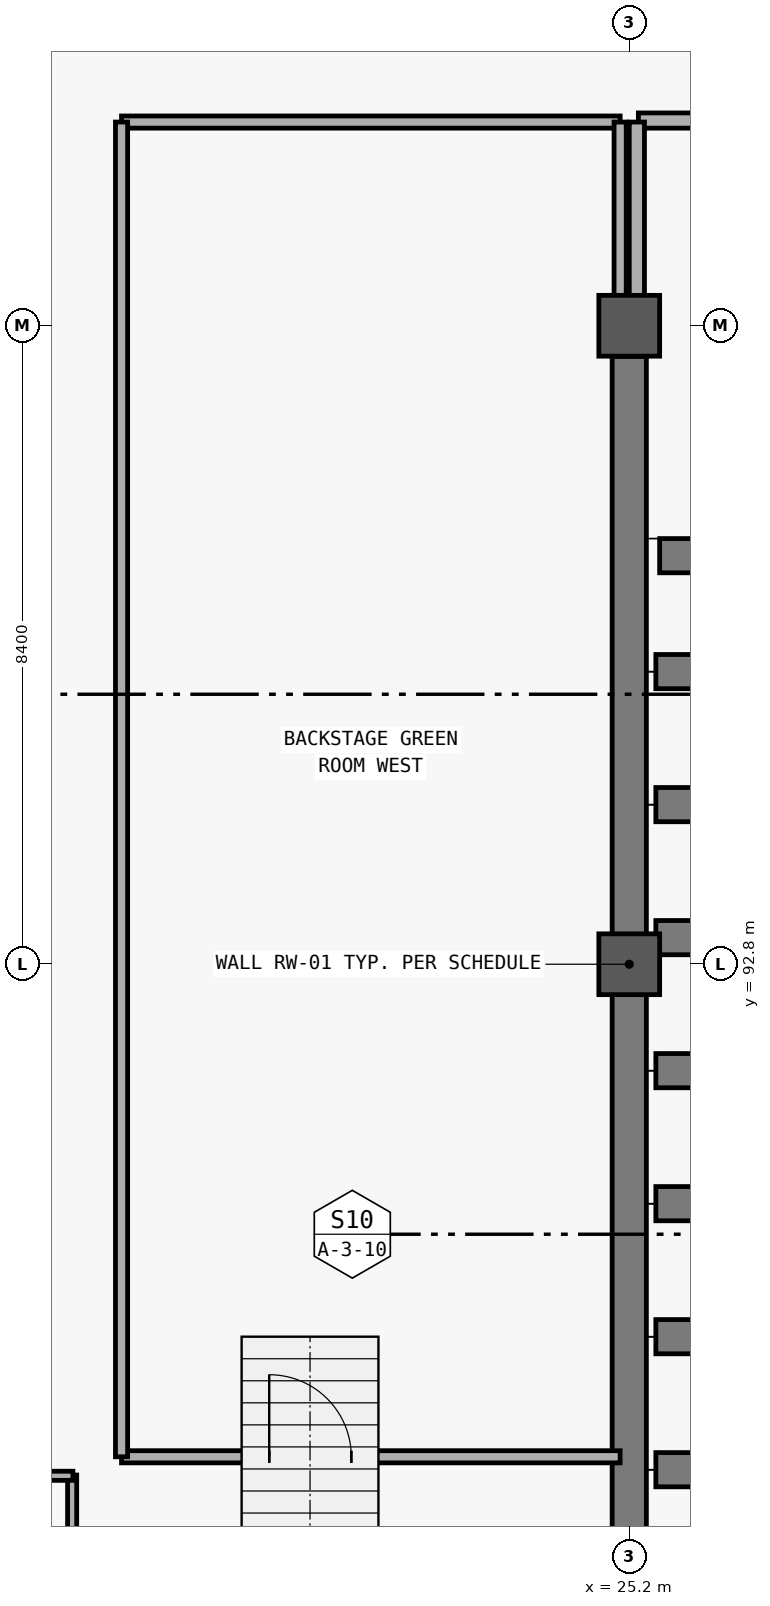
"""IFC4 building model, lengths in metres.
Left out: names, types, materials, properties, quantities, classifications, styles, units other than length and angle.
Written with IfcOpenShell. Run it as: python <this file> out.ifc"""

import sys

from ifc_helpers import new_model, si_unit, direction, frame, frame_2d, origin, origin_2d, place, context, subcontext, project, spatial, rectangle, extrude, element, fill, save


model = new_model("IFC4")
c1 = context("Model", 3, precision=1e-05, world=origin(), true_north=direction((0.0, 1.0)))
c2 = subcontext(c1, "Body", "Model", "MODEL_VIEW")
j1 = project(units=[si_unit("LENGTHUNIT", "METRE"), si_unit("PLANEANGLEUNIT", "RADIAN")], contexts=[c1])
p1 = place(None, origin())
s1 = spatial("IfcSite", under=j1, at=p1, CompositionType="ELEMENT")
p2 = place(p1, origin())
s2 = spatial("IfcBuilding", under=s1, at=p2, CompositionType="ELEMENT")
p3 = place(p2, origin())
s3 = spatial("IfcBuildingStorey", under=s2, at=p3, CompositionType="ELEMENT", Elevation=0.0)
for number, where, z_axis, x_axis in (
    (1, (25.2, 92.8, 0.0), (0.0, 0.0, 1.0), (1.0, 0.0, 0.0)),
    (2, (25.2, 101.2, 0.0), (0.0, 0.0, 1.0), (1.0, 0.0, 0.0)),
):
    element("IfcColumn", number, at=place(p3, frame(where, z_axis=z_axis, x_axis=x_axis)), inside=s3, PredefinedType="COLUMN", context=c2, shape_type="SweptSolid", body=[
        extrude(rectangle(XDim=0.8, YDim=0.8, at=origin_2d()), origin(), (0.0, 0.0, 1.0), 5.4),
    ])
p4 = place(p3, frame((25.2, 84.8, 0.0), z_axis=(0.0, 0.0, 1.0), x_axis=(0.0, 1.0, 0.0)))
e3 = element("IfcWall", 3, at=p4, inside=s3, PredefinedType="USERDEFINED", context=c2, shape_type="SweptSolid", body=[
    extrude(rectangle(XDim=16.0, YDim=0.45, at=frame_2d((8.0, 0.0))), origin(), (0.0, 0.0, 1.0), 5.08),
])
p5 = place(p3, frame((25.6, 98.175, 0.0), z_axis=(0.0, 0.0, 1.0), x_axis=(1.0, 0.0, 0.0)))
e4 = element("IfcWall", 4, at=p5, inside=s3, PredefinedType="USERDEFINED", context=c2, shape_type="SweptSolid", body=[
    extrude(rectangle(XDim=49.6, YDim=0.45, at=frame_2d((24.8, 0.0))), origin(), (0.0, 0.0, 1.0), 1.62),
])
p6 = place(p3, frame((25.55, 86.15, 0.0), z_axis=(0.0, 0.0, 1.0), x_axis=(1.0, 0.0, 0.0)))
e5 = element("IfcWall", 5, at=p6, inside=s3, PredefinedType="USERDEFINED", context=c2, shape_type="SweptSolid", body=[
    extrude(rectangle(XDim=49.7, YDim=0.45, at=frame_2d((24.85, 0.0))), origin(), (0.0, 0.0, 1.0), 4.42),
])
for number, where, z_axis, x_axis in (
    (6, (25.55, 87.9, 0.0), (0.0, 0.0, 1.0), (1.0, 0.0, 0.0)),
    (7, (25.55, 89.65, 0.0), (0.0, 0.0, 1.0), (1.0, 0.0, 0.0)),
):
    element("IfcWall", number, at=place(p3, frame(where, z_axis=z_axis, x_axis=x_axis)), inside=s3, PredefinedType="USERDEFINED", context=c2, shape_type="SweptSolid", body=[
        extrude(rectangle(XDim=49.7, YDim=0.45, at=frame_2d((24.85, 0.0))), origin(), (0.0, 0.0, 1.0), 5.08),
    ])
p7 = place(p3, frame((25.55, 91.4, 0.0), z_axis=(0.0, 0.0, 1.0), x_axis=(1.0, 0.0, 0.0)))
e8 = element("IfcWall", 8, at=p7, inside=s3, PredefinedType="USERDEFINED", context=c2, shape_type="SweptSolid", body=[
    extrude(rectangle(XDim=49.7, YDim=0.45, at=frame_2d((24.85, 0.0))), origin(), (0.0, 0.0, 1.0), 3.22),
])
p8 = place(p3, frame((25.55, 93.15, 0.0), z_axis=(0.0, 0.0, 1.0), x_axis=(1.0, 0.0, 0.0)))
e9 = element("IfcWall", 9, at=p8, inside=s3, PredefinedType="USERDEFINED", context=c2, shape_type="SweptSolid", body=[
    extrude(rectangle(XDim=49.7, YDim=0.45, at=frame_2d((24.85, 0.0))), origin(), (0.0, 0.0, 1.0), 2.82),
])
p9 = place(p3, frame((25.55, 94.9, 0.0), z_axis=(0.0, 0.0, 1.0), x_axis=(1.0, 0.0, 0.0)))
e10 = element("IfcWall", 10, at=p9, inside=s3, PredefinedType="USERDEFINED", context=c2, shape_type="SweptSolid", body=[
    extrude(rectangle(XDim=49.7, YDim=0.45, at=frame_2d((24.85, 0.0))), origin(), (0.0, 0.0, 1.0), 2.42),
])
p10 = place(p3, frame((25.55, 96.65, 0.0), z_axis=(0.0, 0.0, 1.0), x_axis=(1.0, 0.0, 0.0)))
e11 = element("IfcWall", 11, at=p10, inside=s3, PredefinedType="USERDEFINED", context=c2, shape_type="SweptSolid", body=[
    extrude(rectangle(XDim=49.7, YDim=0.45, at=frame_2d((24.85, 0.0))), origin(), (0.0, 0.0, 1.0), 2.02),
])
p11 = place(p3, frame((17.87, 81.72, 0.0), z_axis=(0.0, 0.0, 1.0), x_axis=(0.0, 1.0, 0.0)))
e12 = element("IfcWall", 12, at=p11, inside=s3, PredefinedType="PARTITIONING", context=c2, shape_type="SweptSolid", body=[
    extrude(rectangle(XDim=4.36, YDim=0.12, at=frame_2d((2.18, 0.0))), origin(), (0.0, 0.0, 1.0), 4.18),
])
p12 = place(p11, frame((0.68, 0.0, 0.0)))
e13 = element("IfcOpeningElement", 13, at=p12, cuts=e12, PredefinedType="OPENING", context=c2, shape_type="SweptSolid", body=[
    extrude(rectangle(XDim=1.04, YDim=2.15, at=frame_2d((0.52, 1.075))), frame((0.0, 0.07, 0.0), z_axis=(0.0, -1.0, 0.0), x_axis=(1.0, 0.0, 0.0)), (0.0, 0.0, 1.0), 0.14),
])
p13 = place(p3, frame((25.32, 103.9, 0.0), z_axis=(0.0, 0.0, 1.0), x_axis=(1.0, 0.0, 0.0)))
e14 = element("IfcWall", 14, at=p13, inside=s3, PredefinedType="SOLIDWALL", context=c2, shape_type="SweptSolid", body=[
    extrude(rectangle(XDim=50.16, YDim=0.2, at=frame_2d((25.08, 0.0))), origin(), (0.0, 0.0, 1.0), 4.18),
])
p14 = place(p13, frame((20.166, 0.0, 0.0)))
e15 = element("IfcOpeningElement", 15, at=p14, cuts=e14, PredefinedType="OPENING", context=c2, shape_type="SweptSolid", body=[
    extrude(rectangle(XDim=1.6, YDim=2.3, at=frame_2d((0.8, 1.15))), frame((0.0, 0.11, 0.0), z_axis=(0.0, -1.0, 0.0), x_axis=(1.0, 0.0, 0.0)), (0.0, 0.0, 1.0), 0.22),
])
p15 = place(p3, frame((18.52, 86.32, 0.0), z_axis=(0.0, 0.0, 1.0), x_axis=(1.0, 0.0, 0.0)))
e16 = element("IfcWall", 16, at=p15, inside=s3, PredefinedType="PARTITIONING", context=c2, shape_type="SweptSolid", body=[
    extrude(rectangle(XDim=6.56, YDim=0.16, at=frame_2d((3.28, 0.0))), origin(), (0.0, 0.0, 1.0), 4.18),
])
p16 = place(p15, frame((1.943, 0.0, 0.0)))
e17 = element("IfcOpeningElement", 17, at=p16, cuts=e16, PredefinedType="OPENING", context=c2, shape_type="SweptSolid", body=[
    extrude(rectangle(XDim=1.08, YDim=2.25, at=frame_2d((0.54, 1.125))), frame((0.0, 0.09, 0.0), z_axis=(0.0, -1.0, 0.0), x_axis=(1.0, 0.0, 0.0)), (0.0, 0.0, 1.0), 0.18),
])
p17 = place(p3, frame((12.12, 86.07, 0.0), z_axis=(0.0, 0.0, 1.0), x_axis=(1.0, 0.0, 0.0)))
e18 = element("IfcWall", 18, at=p17, inside=s3, PredefinedType="PARTITIONING", context=c2, shape_type="SweptSolid", body=[
    extrude(rectangle(XDim=5.76, YDim=0.12, at=frame_2d((2.88, 0.0))), origin(), (0.0, 0.0, 1.0), 4.18),
])
p18 = place(p3, frame((25.3, 100.8, 0.0), z_axis=(0.0, 0.0, 1.0), x_axis=(0.0, 1.0, 0.0)))
e19 = element("IfcWall", 19, at=p18, inside=s3, PredefinedType="SOLIDWALL", context=c2, shape_type="SweptSolid", body=[
    extrude(rectangle(XDim=3.08, YDim=0.2, at=frame_2d((1.54, 0.0))), origin(), (0.0, 0.0, 1.0), 4.18),
])
p19 = place(p3, frame((18.52, 103.88, 0.0), z_axis=(0.0, 0.0, 1.0), x_axis=(1.0, 0.0, 0.0)))
e20 = element("IfcWall", 20, at=p19, inside=s3, PredefinedType="PARTITIONING", context=c2, shape_type="SweptSolid", body=[
    extrude(rectangle(XDim=6.56, YDim=0.16, at=frame_2d((3.28, 0.0))), origin(), (0.0, 0.0, 1.0), 4.18),
])
p20 = place(p3, frame((18.52, 86.32, 0.0), z_axis=(0.0, 0.0, 1.0), x_axis=(0.0, 1.0, 0.0)))
e21 = element("IfcWall", 21, at=p20, inside=s3, PredefinedType="PARTITIONING", context=c2, shape_type="SweptSolid", body=[
    extrude(rectangle(XDim=17.56, YDim=0.16, at=frame_2d((8.78, 0.0))), origin(), (0.0, 0.0, 1.0), 4.18),
])
p21 = place(p3, frame((25.08, 100.8, 0.0), z_axis=(0.0, 0.0, 1.0), x_axis=(0.0, 1.0, 0.0)))
e22 = element("IfcWall", 22, at=p21, inside=s3, PredefinedType="PARTITIONING", context=c2, shape_type="SweptSolid", body=[
    extrude(rectangle(XDim=3.08, YDim=0.16, at=frame_2d((1.54, 0.0))), origin(), (0.0, 0.0, 1.0), 4.18),
])
p22 = place(p16, origin())
e23 = element("IfcDoor", 23, at=p22, inside=s3, OperationType="SINGLE_SWING_LEFT", PredefinedType="DOOR", context=c2, shape_type="SweptSolid", body=[
    extrude(rectangle(XDim=1.08, YDim=2.25, at=frame_2d((0.54, 1.125))), frame((0.0, 0.025, 0.0), z_axis=(0.0, -1.0, 0.0), x_axis=(1.0, 0.0, 0.0)), (0.0, 0.0, 1.0), 0.05),
])
fill(e17, e23)
save(model, sys.argv[1])
